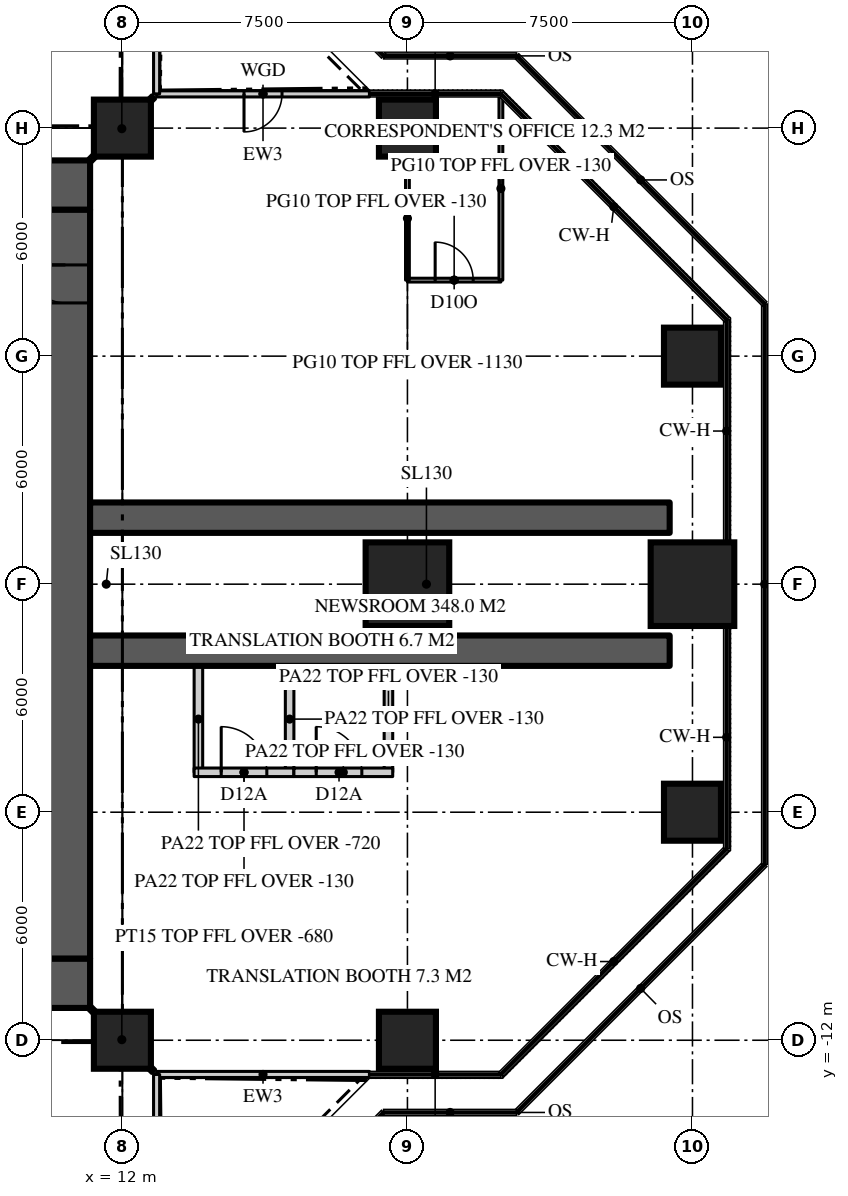
"""IFC4 building model, lengths in metres.
Left out: names, types, materials, properties, quantities, classifications, styles, units other than length and angle.
Written with IfcOpenShell. Run it as: python <this file> out.ifc"""

import sys

from ifc_helpers import new_model, si_unit, direction, frame, frame_2d, origin, origin_2d, place, context, subcontext, project, spatial, rectangle, extrude, element, fill, save


model = new_model("IFC4")
c1 = context("Model", 3, precision=1e-05, world=origin(), true_north=direction((0.0, 1.0)))
c2 = subcontext(c1, "Body", "Model", "MODEL_VIEW")
j1 = project(units=[si_unit("LENGTHUNIT", "METRE"), si_unit("PLANEANGLEUNIT", "RADIAN")], contexts=[c1])
p1 = place(None, origin())
s1 = spatial("IfcSite", under=j1, at=p1, CompositionType="ELEMENT")
p2 = place(p1, origin())
s2 = spatial("IfcBuilding", under=s1, at=p2, CompositionType="ELEMENT")
p3 = place(p2, frame((0.0, 0.0, 240.0)))
s3 = spatial("IfcBuildingStorey", under=s2, at=p3, CompositionType="ELEMENT", Elevation=240.0)
p4 = place(p3, frame((-11.15, 10.5, 0.0), z_axis=(0.0, 0.0, 1.0), x_axis=(1.0, 0.0, 0.0)))
e1 = element("IfcWall", 1, at=p4, inside=s3, PredefinedType="SHEAR", context=c2, shape_type="SweptSolid", body=[
    extrude(rectangle(XDim=22.3, YDim=1.3, at=frame_2d((11.15, 0.0))), origin(), (0.0, 0.0, 1.0), 3.9),
])
p5 = place(p4, frame((4.25, 0.0, 0.0)))
e2 = element("IfcOpeningElement", 2, at=p5, cuts=e1, PredefinedType="OPENING", context=c2, shape_type="SweptSolid", body=[
    extrude(rectangle(XDim=1.8, YDim=2.2, at=frame_2d((0.9, 1.1))), frame((0.0, 0.66, 0.0), z_axis=(0.0, -1.0, 0.0), x_axis=(1.0, 0.0, 0.0)), (0.0, 0.0, 1.0), 1.32),
])
p6 = place(p4, frame((16.25, 0.0, 0.0)))
e3 = element("IfcOpeningElement", 3, at=p6, cuts=e1, PredefinedType="OPENING", context=c2, shape_type="SweptSolid", body=[
    extrude(rectangle(XDim=1.8, YDim=2.2, at=frame_2d((0.9, 1.1))), frame((0.0, 0.66, 0.0), z_axis=(0.0, -1.0, 0.0), x_axis=(1.0, 0.0, 0.0)), (0.0, 0.0, 1.0), 1.32),
])
p7 = place(p3, frame((11.15, -10.5, 0.0), z_axis=(0.0, 0.0, 1.0), x_axis=(-1.0, 0.0, 0.0)))
e4 = element("IfcWall", 4, at=p7, inside=s3, PredefinedType="SHEAR", context=c2, shape_type="SweptSolid", body=[
    extrude(rectangle(XDim=22.3, YDim=1.3, at=frame_2d((11.15, 0.0))), origin(), (0.0, 0.0, 1.0), 3.9),
])
p8 = place(p7, frame((16.25, 0.0, 0.0)))
e5 = element("IfcOpeningElement", 5, at=p8, cuts=e4, PredefinedType="OPENING", context=c2, shape_type="SweptSolid", body=[
    extrude(rectangle(XDim=1.8, YDim=2.2, at=frame_2d((0.9, 1.1))), frame((0.0, 0.66, 0.0), z_axis=(0.0, -1.0, 0.0), x_axis=(1.0, 0.0, 0.0)), (0.0, 0.0, 1.0), 1.32),
])
p9 = place(p7, frame((4.25, 0.0, 0.0)))
e6 = element("IfcOpeningElement", 6, at=p9, cuts=e4, PredefinedType="OPENING", context=c2, shape_type="SweptSolid", body=[
    extrude(rectangle(XDim=1.8, YDim=2.2, at=frame_2d((0.9, 1.1))), frame((0.0, 0.66, 0.0), z_axis=(0.0, -1.0, 0.0), x_axis=(1.0, 0.0, 0.0)), (0.0, 0.0, 1.0), 1.32),
])
p10 = place(p3, frame((10.5, -9.85, 0.0), z_axis=(0.0, 0.0, 1.0), x_axis=(0.0, 1.0, 0.0)))
e7 = element("IfcWall", 7, at=p10, inside=s3, PredefinedType="SHEAR", context=c2, shape_type="SweptSolid", body=[
    extrude(rectangle(XDim=19.7, YDim=1.3, at=frame_2d((9.85, 0.0))), origin(), (0.0, 0.0, 1.0), 3.9),
])
p11 = place(p10, frame((17.25, 0.0, 0.0)))
e8 = element("IfcOpeningElement", 8, at=p11, cuts=e7, PredefinedType="OPENING", context=c2, shape_type="SweptSolid", body=[
    extrude(rectangle(XDim=1.0, YDim=2.2, at=frame_2d((0.5, 1.1))), frame((0.0, 0.66, 0.0), z_axis=(0.0, -1.0, 0.0), x_axis=(1.0, 0.0, 0.0)), (0.0, 0.0, 1.0), 1.32),
])
for number, where, z_axis, x_axis in (
    (9, (11.15, -1.75, 0.0), (0.0, 0.0, 1.0), (1.0, 0.0, 0.0)),
    (10, (11.15, 1.75, 0.0), (0.0, 0.0, 1.0), (1.0, 0.0, 0.0)),
):
    element("IfcWall", number, at=place(p3, frame(where, z_axis=z_axis, x_axis=x_axis)), inside=s3, PredefinedType="SHEAR", context=c2, shape_type="SweptSolid", body=[
        extrude(rectangle(XDim=15.25, YDim=0.8, at=frame_2d((7.625, 0.0))), origin(), (0.0, 0.0, 1.0), 3.9),
    ])
for number, where, z_axis, x_axis in (
    (11, (12.0, -12.0, 0.0), (0.0, 0.0, 1.0), (1.0, 0.0, 0.0)),
    (12, (19.5, -12.0, 0.0), (0.0, 0.0, 1.0), (1.0, 0.0, 0.0)),
    (13, (27.0, -6.0, 0.0), (0.0, 0.0, 1.0), (1.0, 0.0, 0.0)),
):
    element("IfcColumn", number, at=place(p3, frame(where, z_axis=z_axis, x_axis=x_axis)), inside=s3, PredefinedType="COLUMN", context=c2, shape_type="SweptSolid", body=[
        extrude(rectangle(XDim=1.5, YDim=1.5, at=origin_2d()), origin(), (0.0, 0.0, 1.0), 3.9),
    ])
for number, where, z_axis, x_axis in (
    (14, (19.5, 0.0, 0.0), (0.0, 0.0, 1.0), (1.0, 0.0, 0.0)),
    (15, (27.0, 0.0, 0.0), (0.0, 0.0, 1.0), (1.0, 0.0, 0.0)),
):
    element("IfcColumn", number, at=place(p3, frame(where, z_axis=z_axis, x_axis=x_axis)), inside=s3, PredefinedType="COLUMN", context=c2, shape_type="SweptSolid", body=[
        extrude(rectangle(XDim=2.2, YDim=2.2, at=origin_2d()), origin(), (0.0, 0.0, 1.0), 3.9),
    ])
for number, where, z_axis, x_axis in (
    (16, (27.0, 6.0, 0.0), (0.0, 0.0, 1.0), (1.0, 0.0, 0.0)),
    (17, (12.0, 12.0, 0.0), (0.0, 0.0, 1.0), (1.0, 0.0, 0.0)),
    (18, (19.5, 12.0, 0.0), (0.0, 0.0, 1.0), (1.0, 0.0, 0.0)),
):
    element("IfcColumn", number, at=place(p3, frame(where, z_axis=z_axis, x_axis=x_axis)), inside=s3, PredefinedType="COLUMN", context=c2, shape_type="SweptSolid", body=[
        extrude(rectangle(XDim=1.5, YDim=1.5, at=origin_2d()), origin(), (0.0, 0.0, 1.0), 3.9),
    ])
p12 = place(p3, frame((12.9, -12.9, 0.0), z_axis=(0.0, 0.0, 1.0), x_axis=(1.0, 0.0, 0.0)))
e19 = element("IfcWall", 19, at=p12, inside=s3, PredefinedType="SOLIDWALL", context=c2, shape_type="SweptSolid", body=[
    extrude(rectangle(XDim=5.6, YDim=0.16, at=frame_2d((2.8, 0.0))), origin(), (0.0, 0.0, 1.0), 3.77),
])
p13 = place(p3, frame((18.5, 12.9, 0.0), z_axis=(0.0, 0.0, 1.0), x_axis=(-1.0, 0.0, 0.0)))
e20 = element("IfcWall", 20, at=p13, inside=s3, PredefinedType="SOLIDWALL", context=c2, shape_type="SweptSolid", body=[
    extrude(rectangle(XDim=5.6, YDim=0.16, at=frame_2d((2.8, 0.0))), origin(), (0.0, 0.0, 1.0), 3.77),
])
p14 = place(p13, frame((2.3, 0.0, 0.0)))
e21 = element("IfcOpeningElement", 21, at=p14, cuts=e20, PredefinedType="OPENING", context=c2, shape_type="SweptSolid", body=[
    extrude(rectangle(XDim=1.0, YDim=2.2, at=frame_2d((0.5, 1.1))), frame((0.0, 0.09, 0.0), z_axis=(0.0, -1.0, 0.0), x_axis=(1.0, 0.0, 0.0)), (0.0, 0.0, 1.0), 0.18),
])
p15 = place(p3, frame((12.9, 12.9, 0.0), z_axis=(0.0, 0.0, 1.0), x_axis=(0.0, 1.0, 0.0)))
e22 = element("IfcWall", 22, at=p15, inside=s3, PredefinedType="SOLIDWALL", context=c2, shape_type="SweptSolid", body=[
    extrude(rectangle(XDim=5.6, YDim=0.16, at=frame_2d((2.8, 0.0))), origin(), (0.0, 0.0, 1.0), 3.77),
])
p16 = place(p3, frame((12.9, -18.5, 0.0), z_axis=(0.0, 0.0, 1.0), x_axis=(0.0, 1.0, 0.0)))
e23 = element("IfcWall", 23, at=p16, inside=s3, PredefinedType="SOLIDWALL", context=c2, shape_type="SweptSolid", body=[
    extrude(rectangle(XDim=5.6, YDim=0.16, at=frame_2d((2.8, 0.0))), origin(), (0.0, 0.0, 1.0), 3.77),
])
p17 = place(p16, frame((2.3, 0.0, 0.0)))
e24 = element("IfcOpeningElement", 24, at=p17, cuts=e23, PredefinedType="OPENING", context=c2, shape_type="SweptSolid", body=[
    extrude(rectangle(XDim=1.0, YDim=2.2, at=frame_2d((0.5, 1.1))), frame((0.0, 0.09, 0.0), z_axis=(0.0, -1.0, 0.0), x_axis=(1.0, 0.0, 0.0)), (0.0, 0.0, 1.0), 0.18),
])
p18 = place(p3, frame((19.5, 8.0, 0.0), z_axis=(0.0, 0.0, 1.0), x_axis=(1.0, 0.0, 0.0)))
e25 = element("IfcWall", 25, at=p18, inside=s3, PredefinedType="PARTITIONING", context=c2, shape_type="SweptSolid", body=[
    extrude(rectangle(XDim=2.459, YDim=0.1, at=frame_2d((1.229, 0.0))), origin(), (0.0, 0.0, 1.0), 3.77),
])
p19 = place(p18, frame((0.729, 0.0, 0.0)))
e26 = element("IfcOpeningElement", 26, at=p19, cuts=e25, PredefinedType="OPENING", context=c2, shape_type="SweptSolid", body=[
    extrude(rectangle(XDim=1.0, YDim=2.2, at=frame_2d((0.5, 1.1))), frame((0.0, 0.06, 0.0), z_axis=(0.0, -1.0, 0.0), x_axis=(1.0, 0.0, 0.0)), (0.0, 0.0, 1.0), 0.12),
])
p20 = place(p3, frame((19.5, 8.0, 0.0), z_axis=(0.0, 0.0, 1.0), x_axis=(0.0, 1.0, 0.0)))
e27 = element("IfcWall", 27, at=p20, inside=s3, PredefinedType="PARTITIONING", context=c2, shape_type="SweptSolid", body=[
    extrude(rectangle(XDim=3.25, YDim=0.1, at=frame_2d((1.625, 0.0))), origin(), (0.0, 0.0, 1.0), 2.77),
])
p21 = place(p3, frame((21.959, 8.0, 0.0), z_axis=(0.0, 0.0, 1.0), x_axis=(0.0, 1.0, 0.0)))
e28 = element("IfcWall", 28, at=p21, inside=s3, PredefinedType="PARTITIONING", context=c2, shape_type="SweptSolid", body=[
    extrude(rectangle(XDim=4.82, YDim=0.1, at=frame_2d((2.41, 0.0))), origin(), (0.0, 0.0, 1.0), 3.77),
])
p22 = place(p3, frame((14.0, -2.15, 0.0), z_axis=(0.0, 0.0, 1.0), x_axis=(0.0, -1.0, 0.0)))
e29 = element("IfcWall", 29, at=p22, inside=s3, PredefinedType="PARTITIONING", context=c2, shape_type="SweptSolid", body=[
    extrude(rectangle(XDim=2.8, YDim=0.225, at=frame_2d((1.4, 0.0))), origin(), (0.0, 0.0, 1.0), 3.18),
])
p23 = place(p3, frame((16.4, -2.15, 0.0), z_axis=(0.0, 0.0, 1.0), x_axis=(0.0, -1.0, 0.0)))
e30 = element("IfcWall", 30, at=p23, inside=s3, PredefinedType="PARTITIONING", context=c2, shape_type="SweptSolid", body=[
    extrude(rectangle(XDim=2.8, YDim=0.225, at=frame_2d((1.4, 0.0))), origin(), (0.0, 0.0, 1.0), 3.77),
])
p24 = place(p3, frame((13.887, -4.95, 0.0), z_axis=(0.0, 0.0, 1.0), x_axis=(1.0, 0.0, 0.0)))
e31 = element("IfcWall", 31, at=p24, inside=s3, PredefinedType="PARTITIONING", context=c2, shape_type="SweptSolid", body=[
    extrude(rectangle(XDim=2.625, YDim=0.225, at=frame_2d((1.312, 0.0))), origin(), (0.0, 0.0, 1.0), 3.77),
])
p25 = place(p24, frame((0.712, 0.0, 0.0)))
e32 = element("IfcOpeningElement", 32, at=p25, cuts=e31, PredefinedType="OPENING", context=c2, shape_type="SweptSolid", body=[
    extrude(rectangle(XDim=1.2, YDim=2.2, at=frame_2d((0.6, 1.1))), frame((0.0, 0.123, 0.0), z_axis=(0.0, -1.0, 0.0), x_axis=(1.0, 0.0, 0.0)), (0.0, 0.0, 1.0), 0.245),
])
p26 = place(p3, frame((19.0, -2.15, 0.0), z_axis=(0.0, 0.0, 1.0), x_axis=(0.0, -1.0, 0.0)))
e33 = element("IfcWall", 33, at=p26, inside=s3, PredefinedType="PARTITIONING", context=c2, shape_type="SweptSolid", body=[
    extrude(rectangle(XDim=2.8, YDim=0.225, at=frame_2d((1.4, 0.0))), origin(), (0.0, 0.0, 1.0), 3.77),
])
p27 = place(p3, frame((16.512, -4.95, 0.0), z_axis=(0.0, 0.0, 1.0), x_axis=(1.0, 0.0, 0.0)))
e34 = element("IfcWall", 34, at=p27, inside=s3, PredefinedType="PARTITIONING", context=c2, shape_type="SweptSolid", body=[
    extrude(rectangle(XDim=2.6, YDim=0.225, at=frame_2d((1.3, 0.0))), origin(), (0.0, 0.0, 1.0), 3.77),
])
p28 = place(p27, frame((0.587, 0.0, 0.0)))
e35 = element("IfcOpeningElement", 35, at=p28, cuts=e34, PredefinedType="OPENING", context=c2, shape_type="SweptSolid", body=[
    extrude(rectangle(XDim=1.2, YDim=2.2, at=frame_2d((0.6, 1.1))), frame((0.0, 0.123, 0.0), z_axis=(0.0, -1.0, 0.0), x_axis=(1.0, 0.0, 0.0)), (0.0, 0.0, 1.0), 0.245),
])
for number, where, z_axis, x_axis in (
    (36, (11.15, 11.15, 0.0), (0.0, 0.0, 1.0), (0.707, 0.707, 0.0)),
    (37, (11.15, -11.15, 0.0), (0.0, 0.0, 1.0), (0.707, -0.707, 0.0)),
):
    element("IfcWall", number, at=place(p3, frame(where, z_axis=z_axis, x_axis=x_axis)), inside=s3, PredefinedType="PARTITIONING", context=c2, shape_type="SweptSolid", body=[
        extrude(rectangle(XDim=2.362, YDim=0.15, at=frame_2d((1.181, 0.0))), origin(), (0.0, 0.0, 1.0), 3.22),
    ])
p29 = place(p14, origin())
e38 = element("IfcDoor", 38, at=p29, inside=s3, OperationType="SINGLE_SWING_RIGHT", PredefinedType="DOOR", context=c2, shape_type="SweptSolid", body=[
    extrude(rectangle(XDim=1.0, YDim=2.2, at=frame_2d((0.5, 1.1))), frame((0.0, 0.025, 0.0), z_axis=(0.0, -1.0, 0.0), x_axis=(1.0, 0.0, 0.0)), (0.0, 0.0, 1.0), 0.05),
])
fill(e21, e38)
p30 = place(p11, origin())
e39 = element("IfcDoor", 39, at=p30, inside=s3, OperationType="SINGLE_SWING_RIGHT", PredefinedType="DOOR", context=c2, shape_type="SweptSolid", body=[
    extrude(rectangle(XDim=1.0, YDim=2.2, at=frame_2d((0.5, 1.1))), frame((0.0, 0.025, 0.0), z_axis=(0.0, -1.0, 0.0), x_axis=(1.0, 0.0, 0.0)), (0.0, 0.0, 1.0), 0.05),
])
fill(e8, e39)
p31 = place(p19, origin())
e40 = element("IfcDoor", 40, at=p31, inside=s3, OperationType="SINGLE_SWING_LEFT", PredefinedType="DOOR", context=c2, shape_type="SweptSolid", body=[
    extrude(rectangle(XDim=1.0, YDim=2.2, at=frame_2d((0.5, 1.1))), frame((0.0, 0.025, 0.0), z_axis=(0.0, -1.0, 0.0), x_axis=(1.0, 0.0, 0.0)), (0.0, 0.0, 1.0), 0.05),
])
fill(e26, e40)
p32 = place(p25, origin())
e41 = element("IfcDoor", 41, at=p32, inside=s3, OperationType="SINGLE_SWING_LEFT", PredefinedType="DOOR", context=c2, shape_type="SweptSolid", body=[
    extrude(rectangle(XDim=1.2, YDim=2.2, at=frame_2d((0.6, 1.1))), frame((0.0, 0.025, 0.0), z_axis=(0.0, -1.0, 0.0), x_axis=(1.0, 0.0, 0.0)), (0.0, 0.0, 1.0), 0.05),
])
fill(e32, e41)
p33 = place(p28, origin())
e42 = element("IfcDoor", 42, at=p33, inside=s3, OperationType="SINGLE_SWING_LEFT", PredefinedType="DOOR", context=c2, shape_type="SweptSolid", body=[
    extrude(rectangle(XDim=1.2, YDim=2.2, at=frame_2d((0.6, 1.1))), frame((0.0, 0.025, 0.0), z_axis=(0.0, -1.0, 0.0), x_axis=(1.0, 0.0, 0.0)), (0.0, 0.0, 1.0), 0.05),
])
fill(e35, e42)
save(model, sys.argv[1])
